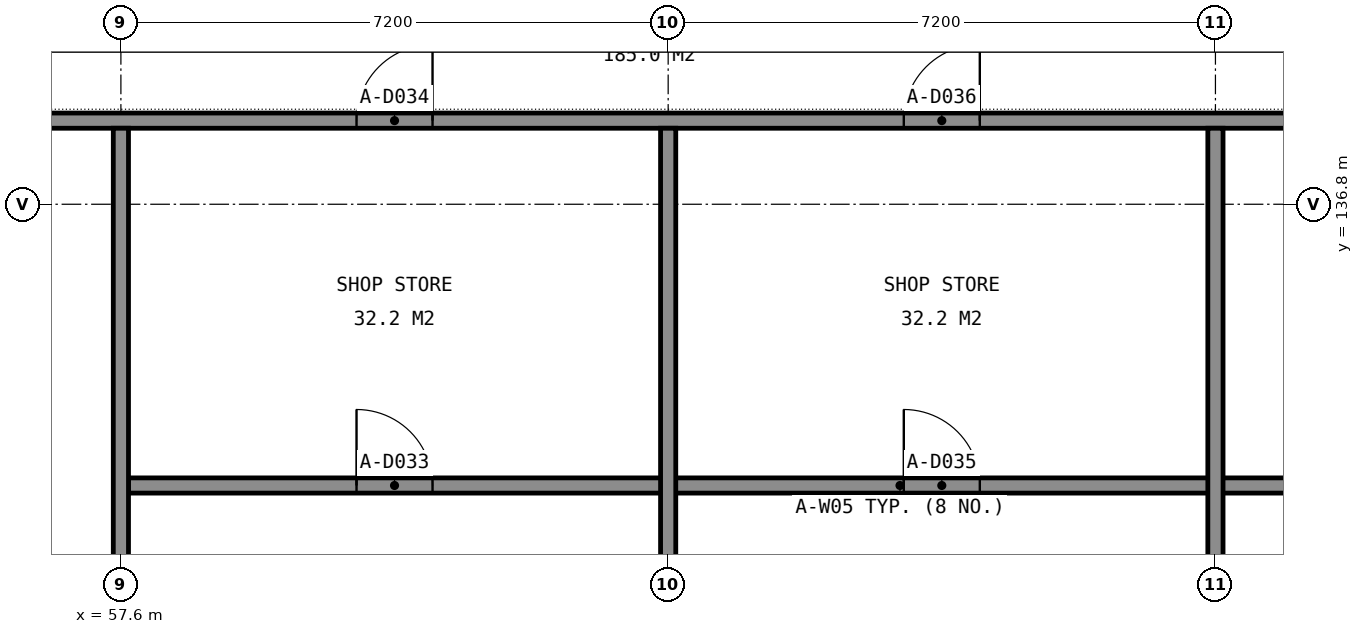
"""IFC4 building model, lengths in metres.
Left out: names, types, materials, properties, quantities, classifications, styles, units other than length and angle.
Written with IfcOpenShell. Run it as: python <this file> out.ifc"""

import sys

from ifc_helpers import new_model, si_unit, direction, frame, frame_2d, origin, place, context, subcontext, project, spatial, rectangle, extrude, element, fill, save


model = new_model("IFC4")
c1 = context("Model", 3, precision=1e-05, world=origin(), true_north=direction((0.0, 1.0)))
c2 = subcontext(c1, "Body", "Model", "MODEL_VIEW")
j1 = project(units=[si_unit("LENGTHUNIT", "METRE"), si_unit("PLANEANGLEUNIT", "RADIAN")], contexts=[c1])
p1 = place(None, origin())
s1 = spatial("IfcSite", under=j1, at=p1, CompositionType="ELEMENT")
p2 = place(p1, origin())
s2 = spatial("IfcBuilding", under=s1, at=p2, CompositionType="ELEMENT")
p3 = place(p2, origin())
s3 = spatial("IfcBuildingStorey", under=s2, at=p3, CompositionType="ELEMENT", Elevation=0.0)
p4 = place(p3, frame((57.7, 133.1, 0.0), z_axis=(0.0, 0.0, 1.0), x_axis=(1.0, 0.0, 0.0)))
e1 = element("IfcWall", 1, at=p4, inside=s3, PredefinedType="PARTITIONING", context=c2, shape_type="SweptSolid", body=[
    extrude(rectangle(XDim=86.2, YDim=0.2, at=frame_2d((43.1, 0.0))), origin(), (0.0, 0.0, 1.0), 3.5),
])
p5 = place(p4, frame((3.0, 0.0, 0.0)))
e2 = element("IfcOpeningElement", 2, at=p5, cuts=e1, PredefinedType="OPENING", context=c2, shape_type="SweptSolid", body=[
    extrude(rectangle(XDim=1.0, YDim=2.1, at=frame_2d((0.5, 1.05))), frame((0.0, 0.11, 0.0), z_axis=(0.0, -1.0, 0.0), x_axis=(1.0, 0.0, 0.0)), (0.0, 0.0, 1.0), 0.22),
])
p6 = place(p4, frame((10.2, 0.0, 0.0)))
e3 = element("IfcOpeningElement", 3, at=p6, cuts=e1, PredefinedType="OPENING", context=c2, shape_type="SweptSolid", body=[
    extrude(rectangle(XDim=1.0, YDim=2.1, at=frame_2d((0.5, 1.05))), frame((0.0, 0.11, 0.0), z_axis=(0.0, -1.0, 0.0), x_axis=(1.0, 0.0, 0.0)), (0.0, 0.0, 1.0), 0.22),
])
p7 = place(p4, frame((17.4, 0.0, 0.0)))
e4 = element("IfcOpeningElement", 4, at=p7, cuts=e1, PredefinedType="OPENING", context=c2, shape_type="SweptSolid", body=[
    extrude(rectangle(XDim=1.0, YDim=2.1, at=frame_2d((0.5, 1.05))), frame((0.0, 0.11, 0.0), z_axis=(0.0, -1.0, 0.0), x_axis=(1.0, 0.0, 0.0)), (0.0, 0.0, 1.0), 0.22),
])
p8 = place(p4, frame((24.6, 0.0, 0.0)))
e5 = element("IfcOpeningElement", 5, at=p8, cuts=e1, PredefinedType="OPENING", context=c2, shape_type="SweptSolid", body=[
    extrude(rectangle(XDim=1.0, YDim=2.1, at=frame_2d((0.5, 1.05))), frame((0.0, 0.11, 0.0), z_axis=(0.0, -1.0, 0.0), x_axis=(1.0, 0.0, 0.0)), (0.0, 0.0, 1.0), 0.22),
])
p9 = place(p4, frame((31.8, 0.0, 0.0)))
e6 = element("IfcOpeningElement", 6, at=p9, cuts=e1, PredefinedType="OPENING", context=c2, shape_type="SweptSolid", body=[
    extrude(rectangle(XDim=1.0, YDim=2.1, at=frame_2d((0.5, 1.05))), frame((0.0, 0.11, 0.0), z_axis=(0.0, -1.0, 0.0), x_axis=(1.0, 0.0, 0.0)), (0.0, 0.0, 1.0), 0.22),
])
p10 = place(p4, frame((39.0, 0.0, 0.0)))
e7 = element("IfcOpeningElement", 7, at=p10, cuts=e1, PredefinedType="OPENING", context=c2, shape_type="SweptSolid", body=[
    extrude(rectangle(XDim=1.0, YDim=2.1, at=frame_2d((0.5, 1.05))), frame((0.0, 0.11, 0.0), z_axis=(0.0, -1.0, 0.0), x_axis=(1.0, 0.0, 0.0)), (0.0, 0.0, 1.0), 0.22),
])
p11 = place(p4, frame((46.2, 0.0, 0.0)))
e8 = element("IfcOpeningElement", 8, at=p11, cuts=e1, PredefinedType="OPENING", context=c2, shape_type="SweptSolid", body=[
    extrude(rectangle(XDim=1.0, YDim=2.1, at=frame_2d((0.5, 1.05))), frame((0.0, 0.11, 0.0), z_axis=(0.0, -1.0, 0.0), x_axis=(1.0, 0.0, 0.0)), (0.0, 0.0, 1.0), 0.22),
])
p12 = place(p4, frame((53.4, 0.0, 0.0)))
e9 = element("IfcOpeningElement", 9, at=p12, cuts=e1, PredefinedType="OPENING", context=c2, shape_type="SweptSolid", body=[
    extrude(rectangle(XDim=1.0, YDim=2.1, at=frame_2d((0.5, 1.05))), frame((0.0, 0.11, 0.0), z_axis=(0.0, -1.0, 0.0), x_axis=(1.0, 0.0, 0.0)), (0.0, 0.0, 1.0), 0.22),
])
p13 = place(p4, frame((60.6, 0.0, 0.0)))
e10 = element("IfcOpeningElement", 10, at=p13, cuts=e1, PredefinedType="OPENING", context=c2, shape_type="SweptSolid", body=[
    extrude(rectangle(XDim=1.0, YDim=2.1, at=frame_2d((0.5, 1.05))), frame((0.0, 0.11, 0.0), z_axis=(0.0, -1.0, 0.0), x_axis=(1.0, 0.0, 0.0)), (0.0, 0.0, 1.0), 0.22),
])
p14 = place(p4, frame((67.8, 0.0, 0.0)))
e11 = element("IfcOpeningElement", 11, at=p14, cuts=e1, PredefinedType="OPENING", context=c2, shape_type="SweptSolid", body=[
    extrude(rectangle(XDim=1.0, YDim=2.1, at=frame_2d((0.5, 1.05))), frame((0.0, 0.11, 0.0), z_axis=(0.0, -1.0, 0.0), x_axis=(1.0, 0.0, 0.0)), (0.0, 0.0, 1.0), 0.22),
])
p15 = place(p4, frame((75.0, 0.0, 0.0)))
e12 = element("IfcOpeningElement", 12, at=p15, cuts=e1, PredefinedType="OPENING", context=c2, shape_type="SweptSolid", body=[
    extrude(rectangle(XDim=1.0, YDim=2.1, at=frame_2d((0.5, 1.05))), frame((0.0, 0.11, 0.0), z_axis=(0.0, -1.0, 0.0), x_axis=(1.0, 0.0, 0.0)), (0.0, 0.0, 1.0), 0.22),
])
p16 = place(p4, frame((84.65, 0.0, 0.0)))
e13 = element("IfcOpeningElement", 13, at=p16, cuts=e1, PredefinedType="OPENING", context=c2, shape_type="SweptSolid", body=[
    extrude(rectangle(XDim=0.9, YDim=2.1, at=frame_2d((0.45, 1.05))), frame((0.0, 0.11, 0.0), z_axis=(0.0, -1.0, 0.0), x_axis=(1.0, 0.0, 0.0)), (0.0, 0.0, 1.0), 0.22),
])
p17 = place(p3, frame((54.35, 137.9, 0.0), z_axis=(0.0, 0.0, 1.0), x_axis=(1.0, 0.0, 0.0)))
e14 = element("IfcWall", 14, at=p17, inside=s3, PredefinedType="PARTITIONING", context=c2, shape_type="SweptSolid", body=[
    extrude(rectangle(XDim=92.9, YDim=0.2, at=frame_2d((46.45, 0.0))), origin(), (0.0, 0.0, 1.0), 3.5),
])
p18 = place(p17, frame((1.1, 0.0, 0.0)))
e15 = element("IfcOpeningElement", 15, at=p18, cuts=e14, PredefinedType="OPENING", context=c2, shape_type="SweptSolid", body=[
    extrude(rectangle(XDim=0.9, YDim=2.1, at=frame_2d((0.45, 1.05))), frame((0.0, 0.11, 0.0), z_axis=(0.0, -1.0, 0.0), x_axis=(1.0, 0.0, 0.0)), (0.0, 0.0, 1.0), 0.22),
])
p19 = place(p17, frame((90.9, 0.0, 0.0)))
e16 = element("IfcOpeningElement", 16, at=p19, cuts=e14, PredefinedType="OPENING", context=c2, shape_type="SweptSolid", body=[
    extrude(rectangle(XDim=0.9, YDim=2.1, at=frame_2d((0.45, 1.05))), frame((0.0, 0.11, 0.0), z_axis=(0.0, -1.0, 0.0), x_axis=(1.0, 0.0, 0.0)), (0.0, 0.0, 1.0), 0.22),
])
p20 = place(p17, frame((6.35, 0.0, 0.0)))
e17 = element("IfcOpeningElement", 17, at=p20, cuts=e14, PredefinedType="OPENING", context=c2, shape_type="SweptSolid", body=[
    extrude(rectangle(XDim=1.0, YDim=2.1, at=frame_2d((0.5, 1.05))), frame((0.0, 0.11, 0.0), z_axis=(0.0, -1.0, 0.0), x_axis=(1.0, 0.0, 0.0)), (0.0, 0.0, 1.0), 0.22),
])
p21 = place(p17, frame((13.55, 0.0, 0.0)))
e18 = element("IfcOpeningElement", 18, at=p21, cuts=e14, PredefinedType="OPENING", context=c2, shape_type="SweptSolid", body=[
    extrude(rectangle(XDim=1.0, YDim=2.1, at=frame_2d((0.5, 1.05))), frame((0.0, 0.11, 0.0), z_axis=(0.0, -1.0, 0.0), x_axis=(1.0, 0.0, 0.0)), (0.0, 0.0, 1.0), 0.22),
])
p22 = place(p17, frame((20.75, 0.0, 0.0)))
e19 = element("IfcOpeningElement", 19, at=p22, cuts=e14, PredefinedType="OPENING", context=c2, shape_type="SweptSolid", body=[
    extrude(rectangle(XDim=1.0, YDim=2.1, at=frame_2d((0.5, 1.05))), frame((0.0, 0.11, 0.0), z_axis=(0.0, -1.0, 0.0), x_axis=(1.0, 0.0, 0.0)), (0.0, 0.0, 1.0), 0.22),
])
p23 = place(p17, frame((27.95, 0.0, 0.0)))
e20 = element("IfcOpeningElement", 20, at=p23, cuts=e14, PredefinedType="OPENING", context=c2, shape_type="SweptSolid", body=[
    extrude(rectangle(XDim=1.0, YDim=2.1, at=frame_2d((0.5, 1.05))), frame((0.0, 0.11, 0.0), z_axis=(0.0, -1.0, 0.0), x_axis=(1.0, 0.0, 0.0)), (0.0, 0.0, 1.0), 0.22),
])
p24 = place(p17, frame((35.15, 0.0, 0.0)))
e21 = element("IfcOpeningElement", 21, at=p24, cuts=e14, PredefinedType="OPENING", context=c2, shape_type="SweptSolid", body=[
    extrude(rectangle(XDim=1.0, YDim=2.1, at=frame_2d((0.5, 1.05))), frame((0.0, 0.11, 0.0), z_axis=(0.0, -1.0, 0.0), x_axis=(1.0, 0.0, 0.0)), (0.0, 0.0, 1.0), 0.22),
])
p25 = place(p17, frame((42.35, 0.0, 0.0)))
e22 = element("IfcOpeningElement", 22, at=p25, cuts=e14, PredefinedType="OPENING", context=c2, shape_type="SweptSolid", body=[
    extrude(rectangle(XDim=1.0, YDim=2.1, at=frame_2d((0.5, 1.05))), frame((0.0, 0.11, 0.0), z_axis=(0.0, -1.0, 0.0), x_axis=(1.0, 0.0, 0.0)), (0.0, 0.0, 1.0), 0.22),
])
p26 = place(p17, frame((49.55, 0.0, 0.0)))
e23 = element("IfcOpeningElement", 23, at=p26, cuts=e14, PredefinedType="OPENING", context=c2, shape_type="SweptSolid", body=[
    extrude(rectangle(XDim=1.0, YDim=2.1, at=frame_2d((0.5, 1.05))), frame((0.0, 0.11, 0.0), z_axis=(0.0, -1.0, 0.0), x_axis=(1.0, 0.0, 0.0)), (0.0, 0.0, 1.0), 0.22),
])
p27 = place(p17, frame((56.75, 0.0, 0.0)))
e24 = element("IfcOpeningElement", 24, at=p27, cuts=e14, PredefinedType="OPENING", context=c2, shape_type="SweptSolid", body=[
    extrude(rectangle(XDim=1.0, YDim=2.1, at=frame_2d((0.5, 1.05))), frame((0.0, 0.11, 0.0), z_axis=(0.0, -1.0, 0.0), x_axis=(1.0, 0.0, 0.0)), (0.0, 0.0, 1.0), 0.22),
])
p28 = place(p17, frame((63.95, 0.0, 0.0)))
e25 = element("IfcOpeningElement", 25, at=p28, cuts=e14, PredefinedType="OPENING", context=c2, shape_type="SweptSolid", body=[
    extrude(rectangle(XDim=1.0, YDim=2.1, at=frame_2d((0.5, 1.05))), frame((0.0, 0.11, 0.0), z_axis=(0.0, -1.0, 0.0), x_axis=(1.0, 0.0, 0.0)), (0.0, 0.0, 1.0), 0.22),
])
p29 = place(p17, frame((71.15, 0.0, 0.0)))
e26 = element("IfcOpeningElement", 26, at=p29, cuts=e14, PredefinedType="OPENING", context=c2, shape_type="SweptSolid", body=[
    extrude(rectangle(XDim=1.0, YDim=2.1, at=frame_2d((0.5, 1.05))), frame((0.0, 0.11, 0.0), z_axis=(0.0, -1.0, 0.0), x_axis=(1.0, 0.0, 0.0)), (0.0, 0.0, 1.0), 0.22),
])
p30 = place(p17, frame((78.35, 0.0, 0.0)))
e27 = element("IfcOpeningElement", 27, at=p30, cuts=e14, PredefinedType="OPENING", context=c2, shape_type="SweptSolid", body=[
    extrude(rectangle(XDim=1.0, YDim=2.1, at=frame_2d((0.5, 1.05))), frame((0.0, 0.11, 0.0), z_axis=(0.0, -1.0, 0.0), x_axis=(1.0, 0.0, 0.0)), (0.0, 0.0, 1.0), 0.22),
])
p31 = place(p17, frame((85.55, 0.0, 0.0)))
e28 = element("IfcOpeningElement", 28, at=p31, cuts=e14, PredefinedType="OPENING", context=c2, shape_type="SweptSolid", body=[
    extrude(rectangle(XDim=1.0, YDim=2.1, at=frame_2d((0.5, 1.05))), frame((0.0, 0.11, 0.0), z_axis=(0.0, -1.0, 0.0), x_axis=(1.0, 0.0, 0.0)), (0.0, 0.0, 1.0), 0.22),
])
for number, where, z_axis, x_axis in (
    (29, (57.6, 129.85, 0.0), (0.0, 0.0, 1.0), (0.0, 1.0, 0.0)),
    (30, (64.8, 129.85, 0.0), (0.0, 0.0, 1.0), (0.0, 1.0, 0.0)),
    (31, (72.0, 129.85, 0.0), (0.0, 0.0, 1.0), (0.0, 1.0, 0.0)),
):
    element("IfcWall", number, at=place(p3, frame(where, z_axis=z_axis, x_axis=x_axis)), inside=s3, PredefinedType="PARTITIONING", context=c2, shape_type="SweptSolid", body=[
        extrude(rectangle(XDim=7.95, YDim=0.2, at=frame_2d((3.975, 0.0))), origin(), (0.0, 0.0, 1.0), 3.5),
    ])
p32 = place(p5, origin())
e32 = element("IfcDoor", 32, at=p32, inside=s3, OperationType="SINGLE_SWING_LEFT", PredefinedType="DOOR", context=c2, shape_type="SweptSolid", body=[
    extrude(rectangle(XDim=1.0, YDim=2.1, at=frame_2d((0.5, 1.05))), frame((0.0, 0.025, 0.0), z_axis=(0.0, -1.0, 0.0), x_axis=(1.0, 0.0, 0.0)), (0.0, 0.0, 1.0), 0.05),
])
fill(e2, e32)
p33 = place(p20, origin())
e33 = element("IfcDoor", 33, at=p33, inside=s3, OperationType="SINGLE_SWING_RIGHT", PredefinedType="DOOR", context=c2, shape_type="SweptSolid", body=[
    extrude(rectangle(XDim=1.0, YDim=2.1, at=frame_2d((0.5, 1.05))), frame((0.0, 0.025, 0.0), z_axis=(0.0, -1.0, 0.0), x_axis=(1.0, 0.0, 0.0)), (0.0, 0.0, 1.0), 0.05),
])
fill(e17, e33)
p34 = place(p6, origin())
e34 = element("IfcDoor", 34, at=p34, inside=s3, OperationType="SINGLE_SWING_LEFT", PredefinedType="DOOR", context=c2, shape_type="SweptSolid", body=[
    extrude(rectangle(XDim=1.0, YDim=2.1, at=frame_2d((0.5, 1.05))), frame((0.0, 0.025, 0.0), z_axis=(0.0, -1.0, 0.0), x_axis=(1.0, 0.0, 0.0)), (0.0, 0.0, 1.0), 0.05),
])
fill(e3, e34)
p35 = place(p21, origin())
e35 = element("IfcDoor", 35, at=p35, inside=s3, OperationType="SINGLE_SWING_RIGHT", PredefinedType="DOOR", context=c2, shape_type="SweptSolid", body=[
    extrude(rectangle(XDim=1.0, YDim=2.1, at=frame_2d((0.5, 1.05))), frame((0.0, 0.025, 0.0), z_axis=(0.0, -1.0, 0.0), x_axis=(1.0, 0.0, 0.0)), (0.0, 0.0, 1.0), 0.05),
])
fill(e18, e35)
save(model, sys.argv[1])
